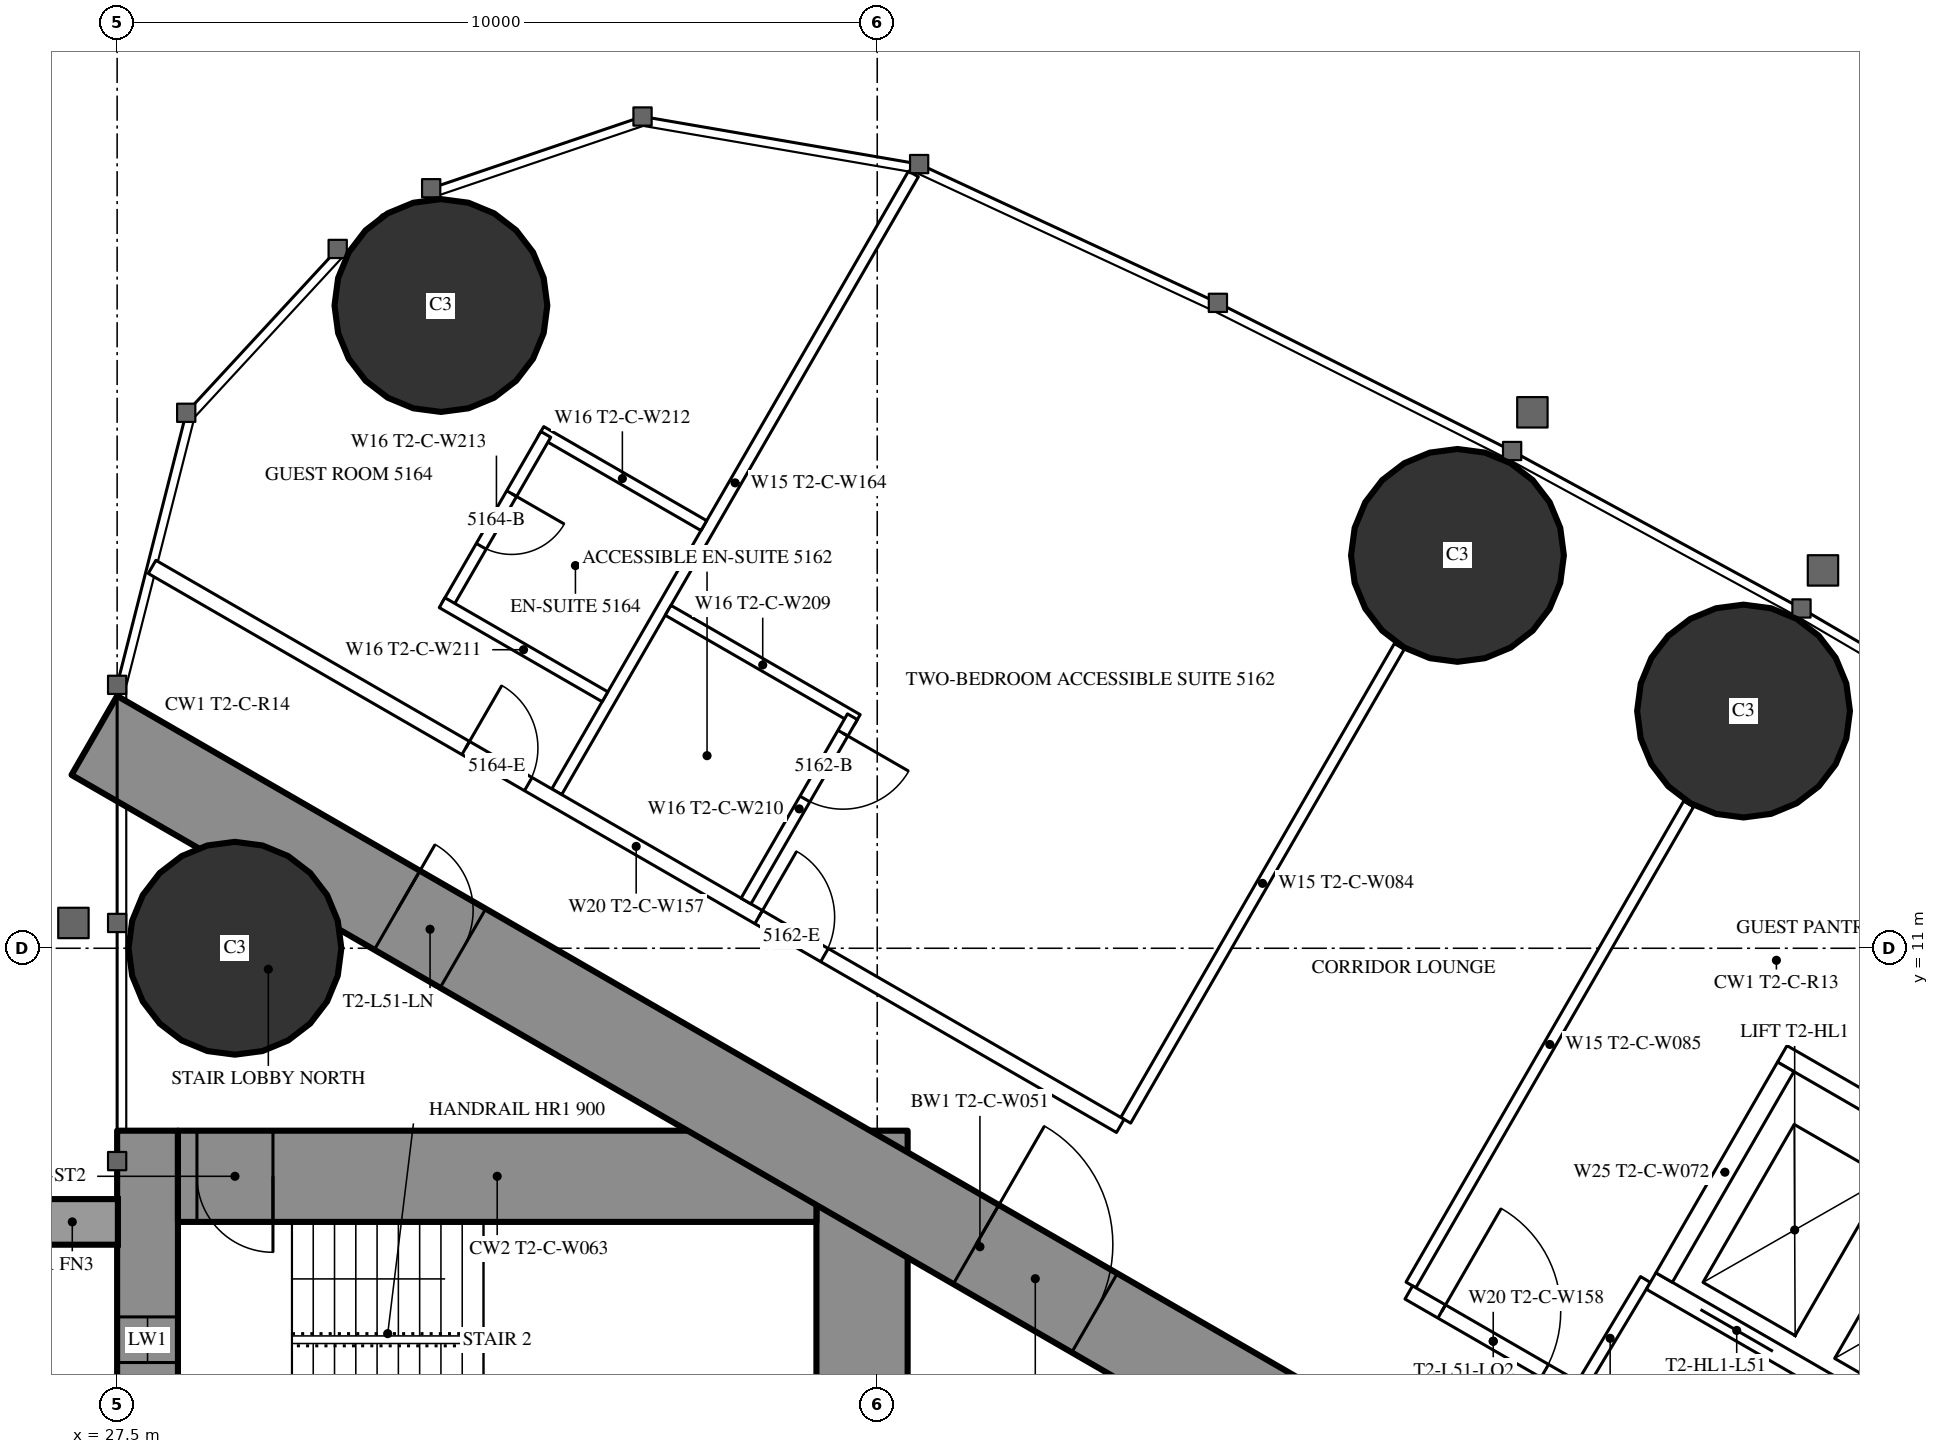
"""IFC4 building model, lengths in metres.
Left out: names, types, materials, properties, quantities, classifications, styles, units other than length and angle.
Written with IfcOpenShell. Run it as: python <this file> out.ifc"""

import sys

from ifc_helpers import new_model, si_unit, direction, frame, frame_2d, origin, origin_2d, place, context, subcontext, project, spatial, rectangle, circle, extrude, element, fill, save


model = new_model("IFC4")
c1 = context("Model", 3, precision=1e-05, world=origin(), true_north=direction((0.0, 1.0)))
c2 = subcontext(c1, "Body", "Model", "MODEL_VIEW")
j1 = project(units=[si_unit("LENGTHUNIT", "METRE"), si_unit("PLANEANGLEUNIT", "RADIAN")], contexts=[c1])
p1 = place(None, origin())
s1 = spatial("IfcSite", under=j1, at=p1, CompositionType="ELEMENT")
p2 = place(p1, origin())
s2 = spatial("IfcBuilding", under=s1, at=p2, CompositionType="ELEMENT")
p3 = place(p2, frame((0.0, 0.0, 191.3)))
s3 = spatial("IfcBuildingStorey", under=s2, at=p3, CompositionType="ELEMENT", Elevation=191.3)
for number, where, z_axis, x_axis in (
    (1, (31.76, 19.456, 0.0), (0.0, 0.0, 1.0), (1.0, 0.0, 0.0)),
    (2, (29.05, 11.0, 0.0), (0.0, 0.0, 1.0), (1.0, 0.0, 0.0)),
    (3, (48.897, 14.121, 0.0), (0.0, 0.0, 1.0), (1.0, 0.0, 0.0)),
    (4, (45.134, 16.168, 0.0), (0.0, 0.0, 1.0), (1.0, 0.0, 0.0)),
):
    element("IfcColumn", number, at=place(p3, frame(where, z_axis=z_axis, x_axis=x_axis)), inside=s3, PredefinedType="COLUMN", context=c2, shape_type="SweptSolid", body=[
        extrude(circle(Radius=1.4, at=origin_2d()), origin(), (0.0, 0.0, 1.0), 3.5),
    ])
p4 = place(p3, frame((27.9, -8.6, 0.0), z_axis=(0.0, 0.0, 1.0), x_axis=(0.0, 1.0, 0.0)))
e5 = element("IfcWall", 5, at=p4, inside=s3, PredefinedType="SHEAR", context=c2, shape_type="SweptSolid", body=[
    extrude(rectangle(XDim=17.2, YDim=0.8, at=frame_2d((8.6, 0.0))), origin(), (0.0, 0.0, 1.0), 3.5),
])
p5 = place(p4, frame((2.45, 0.0, 0.6)))
e6 = element("IfcOpeningElement", 6, at=p5, cuts=e5, PredefinedType="OPENING", context=c2, shape_type="SweptSolid", body=[
    extrude(rectangle(XDim=0.6, YDim=2.1, at=frame_2d((0.3, 1.05))), frame((0.0, 0.41, 0.0), z_axis=(0.0, -1.0, 0.0), x_axis=(1.0, 0.0, 0.0)), (0.0, 0.0, 1.0), 0.82),
])
p6 = place(p4, frame((14.15, 0.0, 0.6)))
e7 = element("IfcOpeningElement", 7, at=p6, cuts=e5, PredefinedType="OPENING", context=c2, shape_type="SweptSolid", body=[
    extrude(rectangle(XDim=0.6, YDim=2.1, at=frame_2d((0.3, 1.05))), frame((0.0, 0.41, 0.0), z_axis=(0.0, -1.0, 0.0), x_axis=(1.0, 0.0, 0.0)), (0.0, 0.0, 1.0), 0.82),
])
p7 = place(p3, frame((37.3, -8.6, 0.0), z_axis=(0.0, 0.0, 1.0), x_axis=(0.0, 1.0, 0.0)))
e8 = element("IfcWall", 8, at=p7, inside=s3, PredefinedType="SHEAR", context=c2, shape_type="SweptSolid", body=[
    extrude(rectangle(XDim=17.2, YDim=1.2, at=frame_2d((8.6, 0.0))), origin(), (0.0, 0.0, 1.0), 3.5),
])
p8 = place(p7, frame((7.7, 0.0, 0.0)))
e9 = element("IfcOpeningElement", 9, at=p8, cuts=e8, PredefinedType="OPENING", context=c2, shape_type="SweptSolid", body=[
    extrude(rectangle(XDim=1.8, YDim=2.2, at=frame_2d((0.9, 1.1))), frame((0.0, 0.61, 0.0), z_axis=(0.0, -1.0, 0.0), x_axis=(1.0, 0.0, 0.0)), (0.0, 0.0, 1.0), 1.22),
])
p9 = place(p3, frame((28.3, 8.0, 0.0), z_axis=(0.0, 0.0, 1.0), x_axis=(1.0, 0.0, 0.0)))
e10 = element("IfcWall", 10, at=p9, inside=s3, PredefinedType="SHEAR", context=c2, shape_type="SweptSolid", body=[
    extrude(rectangle(XDim=8.4, YDim=1.2, at=frame_2d((4.2, 0.0))), origin(), (0.0, 0.0, 1.0), 3.5),
])
p10 = place(p9, frame((0.25, 0.0, 0.0)))
e11 = element("IfcOpeningElement", 11, at=p10, cuts=e10, PredefinedType="OPENING", context=c2, shape_type="SweptSolid", body=[
    extrude(rectangle(XDim=1.0, YDim=2.2, at=frame_2d((0.5, 1.1))), frame((0.0, 0.61, 0.0), z_axis=(0.0, -1.0, 0.0), x_axis=(1.0, 0.0, 0.0)), (0.0, 0.0, 1.0), 1.22),
])
p11 = place(p3, frame((27.2, 13.8, 0.0), z_axis=(0.0, 0.0, 1.0), x_axis=(0.866024515034, -0.500001539357, 0.0)))
e12 = element("IfcWall", 12, at=p11, inside=s3, PredefinedType="SHEAR", context=c2, shape_type="SweptSolid", body=[
    extrude(rectangle(XDim=26.907, YDim=1.2, at=frame_2d((13.454, 0.0))), origin(), (0.0, 0.0, 1.0), 3.5),
])
p12 = place(p11, frame((4.6, 0.0, 0.0)))
e13 = element("IfcOpeningElement", 13, at=p12, cuts=e12, PredefinedType="OPENING", context=c2, shape_type="SweptSolid", body=[
    extrude(rectangle(XDim=1.0, YDim=2.2, at=frame_2d((0.5, 1.1))), frame((0.0, 0.61, 0.0), z_axis=(0.0, -1.0, 0.0), x_axis=(1.0, 0.0, 0.0)), (0.0, 0.0, 1.0), 1.22),
])
p13 = place(p11, frame((13.395, 0.0, 0.0)))
e14 = element("IfcOpeningElement", 14, at=p13, cuts=e12, PredefinedType="OPENING", context=c2, shape_type="SweptSolid", body=[
    extrude(rectangle(XDim=1.8, YDim=2.2, at=frame_2d((0.9, 1.1))), frame((0.0, 0.61, 0.0), z_axis=(0.0, -1.0, 0.0), x_axis=(1.0, 0.0, 0.0)), (0.0, 0.0, 1.0), 1.22),
])
p14 = place(p3, frame((33.284, 13.059, 0.0), z_axis=(0.0, 0.0, 1.0), x_axis=(0.499985904184, 0.866033541855, 0.0)))
e15 = element("IfcWall", 15, at=p14, inside=s3, PredefinedType="PARTITIONING", context=c2, shape_type="SweptSolid", body=[
    extrude(rectangle(XDim=9.385, YDim=0.15, at=frame_2d((4.693, 0.0))), origin(), (0.0, 0.0, 1.0), 3.25),
])
p15 = place(p3, frame((40.769, 8.737, 0.0), z_axis=(0.0, 0.0, 1.0), x_axis=(0.500013115284, 0.866017831539, 0.0)))
e16 = element("IfcWall", 16, at=p15, inside=s3, PredefinedType="PARTITIONING", context=c2, shape_type="SweptSolid", body=[
    extrude(rectangle(XDim=7.198, YDim=0.15, at=frame_2d((3.599, 0.0))), origin(), (0.0, 0.0, 1.0), 2.3),
])
p16 = place(p3, frame((44.521, 6.571, 0.0), z_axis=(0.0, 0.0, 1.0), x_axis=(0.500020376429, 0.866013639128, 0.0)))
e17 = element("IfcWall", 17, at=p16, inside=s3, PredefinedType="PARTITIONING", context=c2, shape_type="SweptSolid", body=[
    extrude(rectangle(XDim=7.306, YDim=0.15, at=frame_2d((3.653, 0.0))), origin(), (0.0, 0.0, 1.0), 2.3),
])
p17 = place(p3, frame((47.606, 6.643, 0.0), z_axis=(0.0, 0.0, 1.0), x_axis=(-0.514237157483, -0.857648031458, 0.0)))
e18 = element("IfcWall", 18, at=p17, inside=s3, PredefinedType="PARTITIONING", context=c2, shape_type="SweptSolid", body=[
    extrude(rectangle(XDim=1.805, YDim=0.15, at=frame_2d((0.902, 0.0))), origin(), (0.0, 0.0, 1.0), 3.25),
])
p18 = place(p3, frame((27.959, 16.017, 0.0), z_axis=(0.0, 0.0, 1.0), x_axis=(0.866024165033, -0.500002145574, 0.0)))
e19 = element("IfcWall", 19, at=p18, inside=s3, PredefinedType="PARTITIONING", context=c2, shape_type="SweptSolid", body=[
    extrude(rectangle(XDim=14.709, YDim=0.2, at=frame_2d((7.354, 0.0))), origin(), (0.0, 0.0, 1.0), 3.25),
])
p19 = place(p18, frame((9.215, 0.0, 0.0)))
e20 = element("IfcOpeningElement", 20, at=p19, cuts=e19, PredefinedType="OPENING", context=c2, shape_type="SweptSolid", body=[
    extrude(rectangle(XDim=1.0, YDim=2.2, at=frame_2d((0.5, 1.1))), frame((0.0, 0.11, 0.0), z_axis=(0.0, -1.0, 0.0), x_axis=(1.0, 0.0, 0.0)), (0.0, 0.0, 1.0), 0.22),
])
p20 = place(p18, frame((4.765, 0.0, 0.0)))
e21 = element("IfcOpeningElement", 21, at=p20, cuts=e19, PredefinedType="OPENING", context=c2, shape_type="SweptSolid", body=[
    extrude(rectangle(XDim=0.95, YDim=2.2, at=frame_2d((0.475, 1.1))), frame((0.0, 0.11, 0.0), z_axis=(0.0, -1.0, 0.0), x_axis=(1.0, 0.0, 0.0)), (0.0, 0.0, 1.0), 0.22),
])
p21 = place(p3, frame((44.493, 6.472, 0.0), z_axis=(0.0, 0.0, 1.0), x_axis=(0.866027140358, -0.499996992154, 0.0)))
e22 = element("IfcWall", 22, at=p21, inside=s3, PredefinedType="PARTITIONING", context=c2, shape_type="SweptSolid", body=[
    extrude(rectangle(XDim=2.566, YDim=0.2, at=frame_2d((1.283, 0.0))), origin(), (0.0, 0.0, 1.0), 3.25),
])
p22 = place(p21, frame((0.5, 0.0, 0.0)))
e23 = element("IfcOpeningElement", 23, at=p22, cuts=e22, PredefinedType="OPENING", context=c2, shape_type="SweptSolid", body=[
    extrude(rectangle(XDim=1.566, YDim=2.2, at=frame_2d((0.783, 1.1))), frame((0.0, 0.11, 0.0), z_axis=(0.0, -1.0, 0.0), x_axis=(1.0, 0.0, 0.0)), (0.0, 0.0, 1.0), 0.22),
])
p23 = place(p3, frame((34.749, 15.446, 0.0), z_axis=(0.0, 0.0, 1.0), x_axis=(0.866018712932, -0.500011588718, 0.0)))
e24 = element("IfcWall", 24, at=p23, inside=s3, PredefinedType="PARTITIONING", context=c2, shape_type="SweptSolid", body=[
    extrude(rectangle(XDim=2.875, YDim=0.15, at=frame_2d((1.438, 0.0))), origin(), (0.0, 0.0, 1.0), 3.25),
])
p24 = place(p3, frame((35.773, 11.621, 0.0), z_axis=(0.0, 0.0, 1.0), x_axis=(0.49998411664, 0.866034573852, 0.0)))
e25 = element("IfcWall", 25, at=p24, inside=s3, PredefinedType="PARTITIONING", context=c2, shape_type="SweptSolid", body=[
    extrude(rectangle(XDim=2.8, YDim=0.15, at=frame_2d((1.4, 0.0))), origin(), (0.0, 0.0, 1.0), 3.25),
])
p25 = place(p24, frame((1.55, 0.0, 0.0)))
e26 = element("IfcOpeningElement", 26, at=p25, cuts=e25, PredefinedType="OPENING", context=c2, shape_type="SweptSolid", body=[
    extrude(rectangle(XDim=1.0, YDim=2.2, at=frame_2d((0.5, 1.1))), frame((0.0, 0.085, 0.0), z_axis=(0.0, -1.0, 0.0), x_axis=(1.0, 0.0, 0.0)), (0.0, 0.0, 1.0), 0.17),
])
p26 = place(p3, frame((33.075, 17.798, 0.0), z_axis=(0.0, 0.0, 1.0), x_axis=(0.866006523861, -0.500032699561, 0.0)))
e27 = element("IfcWall", 27, at=p26, inside=s3, PredefinedType="PARTITIONING", context=c2, shape_type="SweptSolid", body=[
    extrude(rectangle(XDim=2.475, YDim=0.15, at=frame_2d((1.237, 0.0))), origin(), (0.0, 0.0, 1.0), 3.25),
])
p27 = place(p3, frame((31.84, 15.509, 0.0), z_axis=(0.0, 0.0, 1.0), x_axis=(0.500006934395, 0.866021400173, 0.0)))
e28 = element("IfcWall", 28, at=p27, inside=s3, PredefinedType="PARTITIONING", context=c2, shape_type="SweptSolid", body=[
    extrude(rectangle(XDim=2.6, YDim=0.15, at=frame_2d((1.3, 0.0))), origin(), (0.0, 0.0, 1.0), 3.25),
])
p28 = place(p27, frame((0.9, 0.0, 0.0)))
e29 = element("IfcOpeningElement", 29, at=p28, cuts=e28, PredefinedType="OPENING", context=c2, shape_type="SweptSolid", body=[
    extrude(rectangle(XDim=0.8, YDim=2.2, at=frame_2d((0.4, 1.1))), frame((0.0, 0.085, 0.0), z_axis=(0.0, -1.0, 0.0), x_axis=(1.0, 0.0, 0.0)), (0.0, 0.0, 1.0), 0.17),
])
p29 = place(p3, frame((31.775, 15.546, 0.0), z_axis=(0.0, 0.0, 1.0), x_axis=(0.866031185235, -0.4999899861, 0.0)))
e30 = element("IfcWall", 30, at=p29, inside=s3, PredefinedType="PARTITIONING", context=c2, shape_type="SweptSolid", body=[
    extrude(rectangle(XDim=2.475, YDim=0.15, at=frame_2d((1.238, 0.0))), origin(), (0.0, 0.0, 1.0), 3.25),
])
p30 = place(p3, frame((47.681, 6.622, 0.0), z_axis=(0.0, 0.0, 1.0), x_axis=(0.86603344179, -0.499986077507, 0.0)))
e31 = element("IfcWall", 31, at=p30, inside=s3, PredefinedType="PARTITIONING", context=c2, shape_type="SweptSolid", body=[
    extrude(rectangle(XDim=6.6, YDim=0.25, at=frame_2d((3.3, 0.0))), origin(), (0.0, 0.0, 1.0), 3.25),
])
p31 = place(p30, frame((0.75, 0.0, 0.0)))
e32 = element("IfcOpeningElement", 32, at=p31, cuts=e31, PredefinedType="OPENING", context=c2, shape_type="SweptSolid", body=[
    extrude(rectangle(XDim=1.1, YDim=2.2, at=frame_2d((0.55, 1.1))), frame((0.0, 0.135, 0.0), z_axis=(0.0, -1.0, 0.0), x_axis=(1.0, 0.0, 0.0)), (0.0, 0.0, 1.0), 0.27),
])
p32 = place(p30, frame((2.75, 0.0, 0.0)))
e33 = element("IfcOpeningElement", 33, at=p32, cuts=e31, PredefinedType="OPENING", context=c2, shape_type="SweptSolid", body=[
    extrude(rectangle(XDim=1.1, YDim=2.2, at=frame_2d((0.55, 1.1))), frame((0.0, 0.135, 0.0), z_axis=(0.0, -1.0, 0.0), x_axis=(1.0, 0.0, 0.0)), (0.0, 0.0, 1.0), 0.27),
])
p33 = place(p30, frame((4.75, 0.0, 0.0)))
e34 = element("IfcOpeningElement", 34, at=p33, cuts=e31, PredefinedType="OPENING", context=c2, shape_type="SweptSolid", body=[
    extrude(rectangle(XDim=1.1, YDim=2.2, at=frame_2d((0.55, 1.1))), frame((0.0, 0.135, 0.0), z_axis=(0.0, -1.0, 0.0), x_axis=(1.0, 0.0, 0.0)), (0.0, 0.0, 1.0), 0.27),
])
p34 = place(p3, frame((49.406, 9.611, 0.0), z_axis=(0.0, 0.0, 1.0), x_axis=(0.86603344179, -0.499986077507, 0.0)))
e35 = element("IfcWall", 35, at=p34, inside=s3, PredefinedType="PARTITIONING", context=c2, shape_type="SweptSolid", body=[
    extrude(rectangle(XDim=6.6, YDim=0.25, at=frame_2d((3.3, 0.0))), origin(), (0.0, 0.0, 1.0), 3.25),
])
p35 = place(p3, frame((47.852, 6.668, 0.0), z_axis=(0.0, 0.0, 1.0), x_axis=(0.499929347863, 0.866066190972, 0.0)))
e36 = element("IfcWall", 36, at=p35, inside=s3, PredefinedType="PARTITIONING", context=c2, shape_type="SweptSolid", body=[
    extrude(rectangle(XDim=3.201, YDim=0.25, at=frame_2d((1.6, 0.0))), origin(), (0.0, 0.0, 1.0), 3.25),
])
p36 = place(p25, origin())
e37 = element("IfcDoor", 37, at=p36, inside=s3, OperationType="SINGLE_SWING_RIGHT", PredefinedType="DOOR", context=c2, shape_type="SweptSolid", body=[
    extrude(rectangle(XDim=1.0, YDim=2.2, at=frame_2d((0.5, 1.1))), frame((0.0, 0.025, 0.0), z_axis=(0.0, -1.0, 0.0), x_axis=(1.0, 0.0, 0.0)), (0.0, 0.0, 1.0), 0.05),
])
fill(e26, e37)
p37 = place(p19, origin())
e38 = element("IfcDoor", 38, at=p37, inside=s3, OperationType="SINGLE_SWING_LEFT", PredefinedType="DOOR", context=c2, shape_type="SweptSolid", body=[
    extrude(rectangle(XDim=1.0, YDim=2.2, at=frame_2d((0.5, 1.1))), frame((0.0, 0.025, 0.0), z_axis=(0.0, -1.0, 0.0), x_axis=(1.0, 0.0, 0.0)), (0.0, 0.0, 1.0), 0.05),
])
fill(e20, e38)
p38 = place(p28, origin())
e39 = element("IfcDoor", 39, at=p38, inside=s3, OperationType="SINGLE_SWING_RIGHT", PredefinedType="DOOR", context=c2, shape_type="SweptSolid", body=[
    extrude(rectangle(XDim=0.8, YDim=2.2, at=frame_2d((0.4, 1.1))), frame((0.0, 0.025, 0.0), z_axis=(0.0, -1.0, 0.0), x_axis=(1.0, 0.0, 0.0)), (0.0, 0.0, 1.0), 0.05),
])
fill(e29, e39)
p39 = place(p20, origin())
e40 = element("IfcDoor", 40, at=p39, inside=s3, OperationType="SINGLE_SWING_LEFT", PredefinedType="DOOR", context=c2, shape_type="SweptSolid", body=[
    extrude(rectangle(XDim=0.95, YDim=2.2, at=frame_2d((0.475, 1.1))), frame((0.0, 0.025, 0.0), z_axis=(0.0, -1.0, 0.0), x_axis=(1.0, 0.0, 0.0)), (0.0, 0.0, 1.0), 0.05),
])
fill(e21, e40)
p40 = place(p22, origin())
e41 = element("IfcDoor", 41, at=p40, inside=s3, OperationType="SINGLE_SWING_LEFT", PredefinedType="DOOR", context=c2, shape_type="SweptSolid", body=[
    extrude(rectangle(XDim=1.566, YDim=2.2, at=frame_2d((0.783, 1.1))), frame((0.0, 0.025, 0.0), z_axis=(0.0, -1.0, 0.0), x_axis=(1.0, 0.0, 0.0)), (0.0, 0.0, 1.0), 0.05),
])
fill(e23, e41)
p41 = place(p12, origin())
e42 = element("IfcDoor", 42, at=p41, inside=s3, OperationType="SINGLE_SWING_LEFT", PredefinedType="DOOR", context=c2, shape_type="SweptSolid", body=[
    extrude(rectangle(XDim=1.0, YDim=2.2, at=frame_2d((0.5, 1.1))), frame((0.0, 0.025, 0.0), z_axis=(0.0, -1.0, 0.0), x_axis=(1.0, 0.0, 0.0)), (0.0, 0.0, 1.0), 0.05),
])
fill(e13, e42)
p42 = place(p13, origin())
e43 = element("IfcDoor", 43, at=p42, inside=s3, OperationType="DOUBLE_DOOR_SINGLE_SWING", PredefinedType="DOOR", context=c2, shape_type="SweptSolid", body=[
    extrude(rectangle(XDim=1.8, YDim=2.2, at=frame_2d((0.9, 1.1))), frame((0.0, 0.025, 0.0), z_axis=(0.0, -1.0, 0.0), x_axis=(1.0, 0.0, 0.0)), (0.0, 0.0, 1.0), 0.05),
])
fill(e14, e43)
p43 = place(p10, origin())
e44 = element("IfcDoor", 44, at=p43, inside=s3, OperationType="SINGLE_SWING_RIGHT", PredefinedType="DOOR", context=c2, shape_type="SweptSolid", body=[
    extrude(rectangle(XDim=1.0, YDim=2.2, at=frame_2d((0.5, 1.1))), frame((0.0, 0.025, 0.0), z_axis=(0.0, -1.0, 0.0), x_axis=(1.0, 0.0, 0.0)), (0.0, 0.0, 1.0), 0.05),
])
fill(e11, e44)
p44 = place(p31, origin())
e45 = element("IfcDoor", 45, at=p44, inside=s3, OperationType="DOUBLE_DOOR_SLIDING", PredefinedType="USERDEFINED", context=c2, shape_type="SweptSolid", body=[
    extrude(rectangle(XDim=1.1, YDim=2.2, at=frame_2d((0.55, 1.1))), frame((0.0, 0.025, 0.0), z_axis=(0.0, -1.0, 0.0), x_axis=(1.0, 0.0, 0.0)), (0.0, 0.0, 1.0), 0.05),
])
fill(e32, e45)
p45 = place(p6, origin())
e46 = element("IfcWindow", 46, at=p45, inside=s3, PartitioningType="SINGLE_PANEL", PredefinedType="WINDOW", context=c2, shape_type="SweptSolid", body=[
    extrude(rectangle(XDim=0.6, YDim=2.1, at=frame_2d((0.3, 1.05))), frame((0.0, 0.03, 0.0), z_axis=(0.0, -1.0, 0.0), x_axis=(1.0, 0.0, 0.0)), (0.0, 0.0, 1.0), 0.06),
])
fill(e7, e46)
save(model, sys.argv[1])
